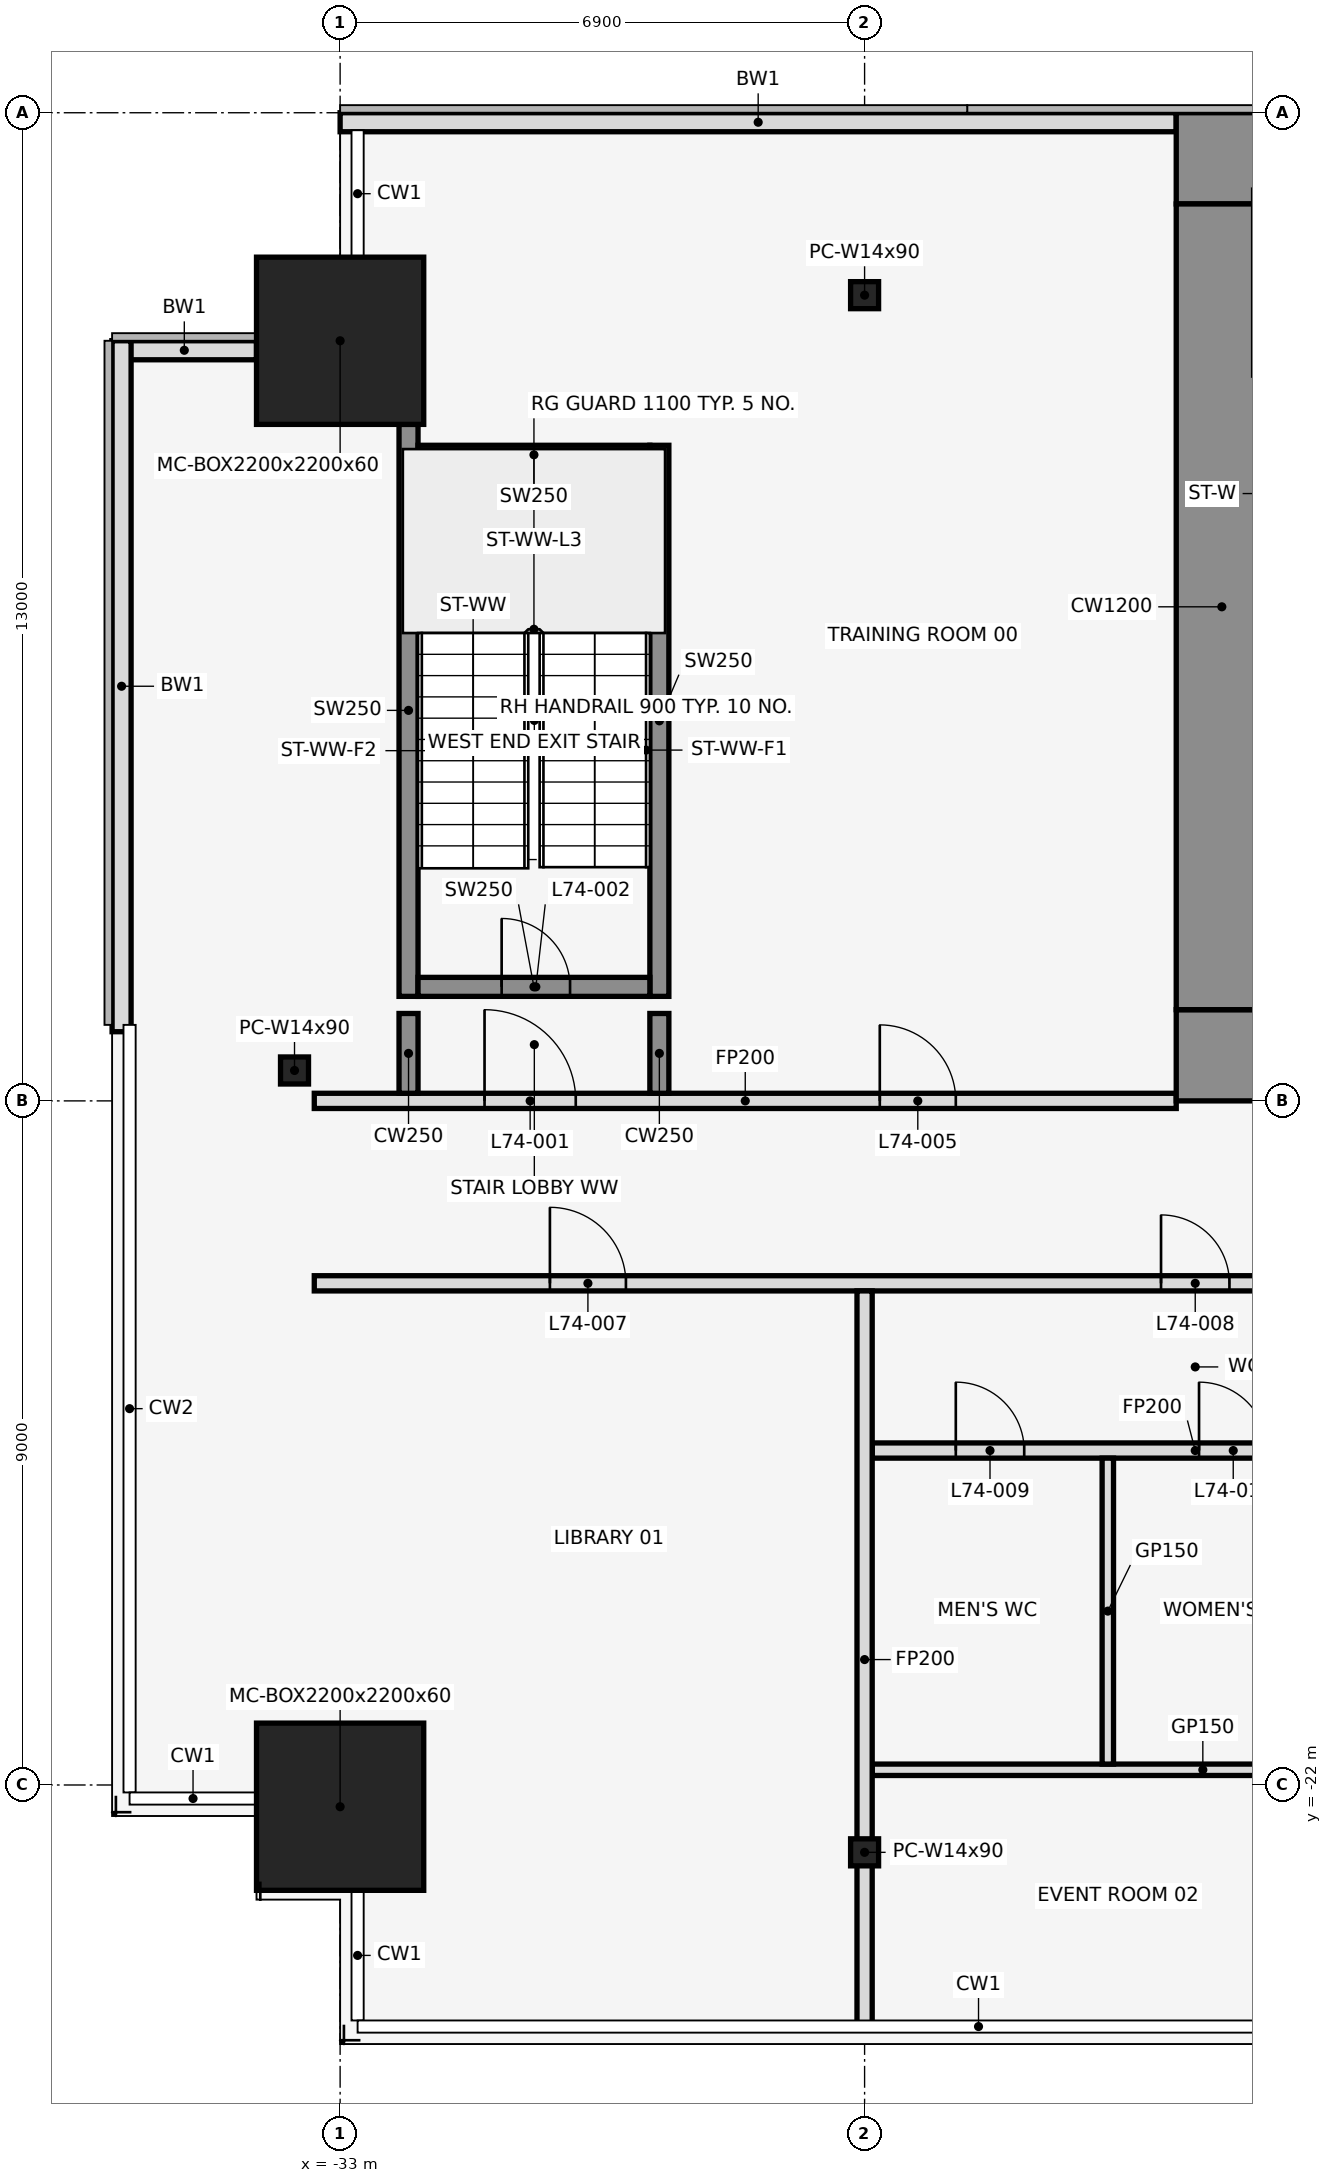
"""IFC4 building model, lengths in metres.
Left out: names, types, materials, properties, quantities, classifications, styles, units other than length and angle.
Written with IfcOpenShell. Run it as: python <this file> out.ifc"""

import sys

from ifc_helpers import new_model, si_unit, direction, frame, frame_2d, origin, origin_2d, place, context, subcontext, project, spatial, rectangle, hollow_rectangle, i_section, extrude, element, fill, save


model = new_model("IFC4")
c1 = context("Model", 3, precision=1e-05, world=origin(), true_north=direction((0.0, 1.0)))
c2 = subcontext(c1, "Body", "Model", "MODEL_VIEW")
j1 = project(units=[si_unit("LENGTHUNIT", "METRE"), si_unit("PLANEANGLEUNIT", "RADIAN")], contexts=[c1])
p1 = place(None, origin())
s1 = spatial("IfcSite", under=j1, at=p1, CompositionType="ELEMENT")
p2 = place(p1, origin())
s2 = spatial("IfcBuilding", under=s1, at=p2, CompositionType="ELEMENT")
p3 = place(p2, frame((0.0, 0.0, 329.0)))
s3 = spatial("IfcBuildingStorey", under=s2, at=p3, CompositionType="ELEMENT", Elevation=329.0)
for number, where, z_axis, x_axis in (
    (1, (-33.0, -22.286, 0.0), (0.0, 0.0, 1.0), (1.0, 0.0, 0.0)),
    (2, (-33.0, -3.0, 0.0), (0.0, 0.0, 1.0), (1.0, 0.0, 0.0)),
):
    element("IfcColumn", number, at=place(p3, frame(where, z_axis=z_axis, x_axis=x_axis)), inside=s3, PredefinedType="COLUMN", context=c2, shape_type="SweptSolid", body=[
        extrude(hollow_rectangle(XDim=2.2, YDim=2.2, WallThickness=0.06, at=origin_2d()), origin(), (0.0, 0.0, 1.0), 4.5),
    ])
for number, where, z_axis, x_axis in (
    (3, (-26.1, -22.886, 0.0), (0.0, 0.0, 1.0), (1.0, 0.0, 0.0)),
    (4, (-26.1, -2.4, 0.0), (0.0, 0.0, 1.0), (1.0, 0.0, 0.0)),
    (5, (-33.6, -12.6, 0.0), (0.0, 0.0, 1.0), (1.0, 0.0, 0.0)),
):
    element("IfcColumn", number, at=place(p3, frame(where, z_axis=z_axis, x_axis=x_axis)), inside=s3, PredefinedType="COLUMN", context=c2, shape_type="SweptSolid", body=[
        extrude(i_section(OverallWidth=0.368, OverallDepth=0.356, WebThickness=0.011, FlangeThickness=0.018, at=origin_2d()), origin(), (0.0, 0.0, 1.0), 4.5),
    ])
p4 = place(p3, frame((-22.0, -0.125, 0.0), z_axis=(0.0, 0.0, 1.0), x_axis=(-1.0, 0.0, 0.0)))
e6 = element("IfcWall", 6, at=p4, inside=s3, PredefinedType="STANDARD", context=c2, shape_type="SweptSolid", body=[
    extrude(rectangle(XDim=11.0, YDim=0.25, at=frame_2d((5.5, 0.0))), origin(), (0.0, 0.0, 1.0), 4.35),
])
p5 = place(p3, frame((-34.1, -3.125, 0.0), z_axis=(0.0, 0.0, 1.0), x_axis=(-1.0, 0.0, 0.0)))
e7 = element("IfcWall", 7, at=p5, inside=s3, PredefinedType="STANDARD", context=c2, shape_type="SweptSolid", body=[
    extrude(rectangle(XDim=1.9, YDim=0.25, at=frame_2d((0.95, 0.0))), origin(), (0.0, 0.0, 1.0), 4.35),
])
p6 = place(p3, frame((-35.875, -3.0, 0.0), z_axis=(0.0, 0.0, 1.0), x_axis=(0.0, -1.0, 0.0)))
e8 = element("IfcWall", 8, at=p6, inside=s3, PredefinedType="STANDARD", context=c2, shape_type="SweptSolid", body=[
    extrude(rectangle(XDim=9.09, YDim=0.25, at=frame_2d((4.545, 0.0))), origin(), (0.0, 0.0, 1.0), 4.35),
])
p7 = place(p3, frame((-32.1, -11.625, 0.0), z_axis=(0.0, 0.0, 1.0), x_axis=(0.0, 1.0, 0.0)))
e9 = element("IfcWall", 9, at=p7, inside=s3, PredefinedType="SHEAR", context=c2, shape_type="SweptSolid", body=[
    extrude(rectangle(XDim=7.525, YDim=0.25, at=frame_2d((3.762, 0.0))), origin(), (0.0, 0.0, 1.0), 4.5),
])
p8 = place(p3, frame((-28.8, -11.625, 0.0), z_axis=(0.0, 0.0, 1.0), x_axis=(0.0, 1.0, 0.0)))
e10 = element("IfcWall", 10, at=p8, inside=s3, PredefinedType="SHEAR", context=c2, shape_type="SweptSolid", body=[
    extrude(rectangle(XDim=7.25, YDim=0.25, at=frame_2d((3.625, 0.0))), origin(), (0.0, 0.0, 1.0), 4.5),
])
p9 = place(p3, frame((-31.975, -11.5, 0.0), z_axis=(0.0, 0.0, 1.0), x_axis=(1.0, 0.0, 0.0)))
e11 = element("IfcWall", 11, at=p9, inside=s3, PredefinedType="SHEAR", context=c2, shape_type="SweptSolid", body=[
    extrude(rectangle(XDim=3.05, YDim=0.25, at=frame_2d((1.525, 0.0))), origin(), (0.0, 0.0, 1.0), 4.5),
])
p10 = place(p9, frame((1.1, 0.0, 0.0)))
e12 = element("IfcOpeningElement", 12, at=p10, cuts=e11, PredefinedType="OPENING", context=c2, shape_type="SweptSolid", body=[
    extrude(rectangle(XDim=0.9, YDim=2.1, at=frame_2d((0.45, 1.05))), frame((0.0, 0.137, 0.0), z_axis=(0.0, -1.0, 0.0), x_axis=(1.0, 0.0, 0.0)), (0.0, 0.0, 1.0), 0.274),
])
p11 = place(p3, frame((-31.975, -4.5, 0.0), z_axis=(0.0, 0.0, 1.0), x_axis=(1.0, 0.0, 0.0)))
e13 = element("IfcWall", 13, at=p11, inside=s3, PredefinedType="SHEAR", context=c2, shape_type="SweptSolid", body=[
    extrude(rectangle(XDim=3.05, YDim=0.25, at=frame_2d((1.525, 0.0))), origin(), (0.0, 0.0, 1.0), 4.5),
])
p12 = place(p3, frame((-26.0, -21.8, 0.0), z_axis=(0.0, 0.0, 1.0), x_axis=(1.0, 0.0, 0.0)))
e14 = element("IfcWall", 14, at=p12, inside=s3, PredefinedType="PARTITIONING", context=c2, shape_type="SweptSolid", body=[
    extrude(rectangle(XDim=8.7, YDim=0.15, at=frame_2d((4.35, 0.0))), origin(), (0.0, 0.0, 1.0), 3.418),
])
p13 = place(p3, frame((-26.0, -17.6, 0.0), z_axis=(0.0, 0.0, 1.0), x_axis=(1.0, 0.0, 0.0)))
e15 = element("IfcWall", 15, at=p13, inside=s3, PredefinedType="PARTITIONING", context=c2, shape_type="SweptSolid", body=[
    extrude(rectangle(XDim=8.5, YDim=0.2, at=frame_2d((4.25, 0.0))), origin(), (0.0, 0.0, 1.0), 3.418),
])
p14 = place(p13, frame((1.1, 0.0, 0.0)))
e16 = element("IfcOpeningElement", 16, at=p14, cuts=e15, PredefinedType="OPENING", context=c2, shape_type="SweptSolid", body=[
    extrude(rectangle(XDim=0.9, YDim=2.1, at=frame_2d((0.45, 1.05))), frame((0.0, 0.112, 0.0), z_axis=(0.0, -1.0, 0.0), x_axis=(1.0, 0.0, 0.0)), (0.0, 0.0, 1.0), 0.224),
])
p15 = place(p13, frame((4.3, 0.0, 0.0)))
e17 = element("IfcOpeningElement", 17, at=p15, cuts=e15, PredefinedType="OPENING", context=c2, shape_type="SweptSolid", body=[
    extrude(rectangle(XDim=0.9, YDim=2.1, at=frame_2d((0.45, 1.05))), frame((0.0, 0.112, 0.0), z_axis=(0.0, -1.0, 0.0), x_axis=(1.0, 0.0, 0.0)), (0.0, 0.0, 1.0), 0.224),
])
p16 = place(p13, frame((6.9, 0.0, 0.0)))
e18 = element("IfcOpeningElement", 18, at=p16, cuts=e15, PredefinedType="OPENING", context=c2, shape_type="SweptSolid", body=[
    extrude(rectangle(XDim=1.0, YDim=2.1, at=frame_2d((0.5, 1.05))), frame((0.0, 0.112, 0.0), z_axis=(0.0, -1.0, 0.0), x_axis=(1.0, 0.0, 0.0)), (0.0, 0.0, 1.0), 0.224),
])
p17 = place(p3, frame((-33.34, -15.4, 0.0), z_axis=(0.0, 0.0, 1.0), x_axis=(1.0, 0.0, 0.0)))
e19 = element("IfcWall", 19, at=p17, inside=s3, PredefinedType="PARTITIONING", context=c2, shape_type="SweptSolid", body=[
    extrude(rectangle(XDim=31.94, YDim=0.2, at=frame_2d((15.97, 0.0))), origin(), (0.0, 0.0, 1.0), 3.418),
])
p18 = place(p17, frame((3.1, 0.0, 0.0)))
e20 = element("IfcOpeningElement", 20, at=p18, cuts=e19, PredefinedType="OPENING", context=c2, shape_type="SweptSolid", body=[
    extrude(rectangle(XDim=1.0, YDim=2.1, at=frame_2d((0.5, 1.05))), frame((0.0, 0.112, 0.0), z_axis=(0.0, -1.0, 0.0), x_axis=(1.0, 0.0, 0.0)), (0.0, 0.0, 1.0), 0.224),
])
p19 = place(p17, frame((11.14, 0.0, 0.0)))
e21 = element("IfcOpeningElement", 21, at=p19, cuts=e19, PredefinedType="OPENING", context=c2, shape_type="SweptSolid", body=[
    extrude(rectangle(XDim=0.9, YDim=2.1, at=frame_2d((0.45, 1.05))), frame((0.0, 0.112, 0.0), z_axis=(0.0, -1.0, 0.0), x_axis=(1.0, 0.0, 0.0)), (0.0, 0.0, 1.0), 0.224),
])
p20 = place(p17, frame((16.84, 0.0, 0.0)))
e22 = element("IfcOpeningElement", 22, at=p20, cuts=e19, PredefinedType="OPENING", context=c2, shape_type="SweptSolid", body=[
    extrude(rectangle(XDim=1.0, YDim=2.1, at=frame_2d((0.5, 1.05))), frame((0.0, 0.112, 0.0), z_axis=(0.0, -1.0, 0.0), x_axis=(1.0, 0.0, 0.0)), (0.0, 0.0, 1.0), 0.224),
])
p21 = place(p3, frame((-33.34, -13.0, 0.0), z_axis=(0.0, 0.0, 1.0), x_axis=(1.0, 0.0, 0.0)))
e23 = element("IfcWall", 23, at=p21, inside=s3, PredefinedType="PARTITIONING", context=c2, shape_type="SweptSolid", body=[
    extrude(rectangle(XDim=11.34, YDim=0.2, at=frame_2d((5.67, 0.0))), origin(), (0.0, 0.0, 1.0), 3.418),
])
p22 = place(p21, frame((2.24, 0.0, 0.0)))
e24 = element("IfcOpeningElement", 24, at=p22, cuts=e23, PredefinedType="OPENING", context=c2, shape_type="SweptSolid", body=[
    extrude(rectangle(XDim=1.2, YDim=2.1, at=frame_2d((0.6, 1.05))), frame((0.0, 0.112, 0.0), z_axis=(0.0, -1.0, 0.0), x_axis=(1.0, 0.0, 0.0)), (0.0, 0.0, 1.0), 0.224),
])
p23 = place(p21, frame((7.44, 0.0, 0.0)))
e25 = element("IfcOpeningElement", 25, at=p23, cuts=e23, PredefinedType="OPENING", context=c2, shape_type="SweptSolid", body=[
    extrude(rectangle(XDim=1.0, YDim=2.1, at=frame_2d((0.5, 1.05))), frame((0.0, 0.112, 0.0), z_axis=(0.0, -1.0, 0.0), x_axis=(1.0, 0.0, 0.0)), (0.0, 0.0, 1.0), 0.224),
])
for number, where, z_axis, x_axis in (
    (26, (-32.1, -12.9, 0.0), (0.0, 0.0, 1.0), (0.0, 1.0, 0.0)),
    (27, (-28.8, -12.9, 0.0), (0.0, 0.0, 1.0), (0.0, 1.0, 0.0)),
):
    element("IfcWall", number, at=place(p3, frame(where, z_axis=z_axis, x_axis=x_axis)), inside=s3, PredefinedType="SHEAR", context=c2, shape_type="SweptSolid", body=[
        extrude(rectangle(XDim=1.05, YDim=0.25, at=frame_2d((0.525, 0.0))), origin(), (0.0, 0.0, 1.0), 4.5),
    ])
p24 = place(p3, frame((-26.1, -25.2, 0.0), z_axis=(0.0, 0.0, 1.0), x_axis=(0.0, 1.0, 0.0)))
e28 = element("IfcWall", 28, at=p24, inside=s3, PredefinedType="PARTITIONING", context=c2, shape_type="SweptSolid", body=[
    extrude(rectangle(XDim=9.7, YDim=0.2, at=frame_2d((4.85, 0.0))), origin(), (0.0, 0.0, 1.0), 3.418),
])
p25 = place(p3, frame((-22.9, -21.725, 0.0), z_axis=(0.0, 0.0, 1.0), x_axis=(0.0, 1.0, 0.0)))
e29 = element("IfcWall", 29, at=p25, inside=s3, PredefinedType="PARTITIONING", context=c2, shape_type="SweptSolid", body=[
    extrude(rectangle(XDim=4.025, YDim=0.15, at=frame_2d((2.013, 0.0))), origin(), (0.0, 0.0, 1.0), 3.418),
])
p26 = place(p3, frame((-22.0, -0.6, 0.0), z_axis=(0.0, 0.0, 1.0), x_axis=(1.0, 0.0, 0.0)))
e30 = element("IfcWall", 30, at=p26, inside=s3, PredefinedType="SHEAR", context=c2, shape_type="SweptSolid", body=[
    extrude(rectangle(XDim=44.0, YDim=1.2, at=frame_2d((22.0, 0.0))), origin(), (0.0, 0.0, 1.0), 4.5),
])
p27 = place(p26, frame((18.55, 0.0, 0.0)))
e31 = element("IfcOpeningElement", 31, at=p27, cuts=e30, PredefinedType="OPENING", context=c2, shape_type="SweptSolid", body=[
    extrude(rectangle(XDim=0.9, YDim=2.1, at=frame_2d((0.45, 1.05))), frame((0.0, 0.612, 0.0), z_axis=(0.0, -1.0, 0.0), x_axis=(1.0, 0.0, 0.0)), (0.0, 0.0, 1.0), 1.224),
])
p28 = place(p26, frame((24.55, 0.0, 0.0)))
e32 = element("IfcOpeningElement", 32, at=p28, cuts=e30, PredefinedType="OPENING", context=c2, shape_type="SweptSolid", body=[
    extrude(rectangle(XDim=0.9, YDim=2.1, at=frame_2d((0.45, 1.05))), frame((0.0, 0.612, 0.0), z_axis=(0.0, -1.0, 0.0), x_axis=(1.0, 0.0, 0.0)), (0.0, 0.0, 1.0), 1.224),
])
p29 = place(p3, frame((-22.0, -12.4, 0.0), z_axis=(0.0, 0.0, 1.0), x_axis=(1.0, 0.0, 0.0)))
e33 = element("IfcWall", 33, at=p29, inside=s3, PredefinedType="SHEAR", context=c2, shape_type="SweptSolid", body=[
    extrude(rectangle(XDim=44.0, YDim=1.2, at=frame_2d((22.0, 0.0))), origin(), (0.0, 0.0, 1.0), 4.5),
])
p30 = place(p29, frame((2.2, 0.0, 0.0)))
e34 = element("IfcOpeningElement", 34, at=p30, cuts=e33, PredefinedType="OPENING", context=c2, shape_type="SweptSolid", body=[
    extrude(rectangle(XDim=1.2, YDim=2.1, at=frame_2d((0.6, 1.05))), frame((0.0, 0.612, 0.0), z_axis=(0.0, -1.0, 0.0), x_axis=(1.0, 0.0, 0.0)), (0.0, 0.0, 1.0), 1.224),
])
p31 = place(p29, frame((21.4, 0.0, 0.0)))
e35 = element("IfcOpeningElement", 35, at=p31, cuts=e33, PredefinedType="OPENING", context=c2, shape_type="SweptSolid", body=[
    extrude(rectangle(XDim=1.2, YDim=2.1, at=frame_2d((0.6, 1.05))), frame((0.0, 0.612, 0.0), z_axis=(0.0, -1.0, 0.0), x_axis=(1.0, 0.0, 0.0)), (0.0, 0.0, 1.0), 1.224),
])
p32 = place(p29, frame((40.6, 0.0, 0.0)))
e36 = element("IfcOpeningElement", 36, at=p32, cuts=e33, PredefinedType="OPENING", context=c2, shape_type="SweptSolid", body=[
    extrude(rectangle(XDim=1.2, YDim=2.1, at=frame_2d((0.6, 1.05))), frame((0.0, 0.612, 0.0), z_axis=(0.0, -1.0, 0.0), x_axis=(1.0, 0.0, 0.0)), (0.0, 0.0, 1.0), 1.224),
])
p33 = place(p29, frame((16.0, 0.0, 0.0)))
e37 = element("IfcOpeningElement", 37, at=p33, cuts=e33, PredefinedType="OPENING", context=c2, shape_type="SweptSolid", body=[
    extrude(rectangle(XDim=1.8, YDim=2.1, at=frame_2d((0.9, 1.05))), frame((0.0, 0.612, 0.0), z_axis=(0.0, -1.0, 0.0), x_axis=(1.0, 0.0, 0.0)), (0.0, 0.0, 1.0), 1.224),
])
p34 = place(p29, frame((6.3, 0.0, 0.0)))
e38 = element("IfcOpeningElement", 38, at=p34, cuts=e33, PredefinedType="OPENING", context=c2, shape_type="SweptSolid", body=[
    extrude(rectangle(XDim=1.2, YDim=2.1, at=frame_2d((0.6, 1.05))), frame((0.0, 0.612, 0.0), z_axis=(0.0, -1.0, 0.0), x_axis=(1.0, 0.0, 0.0)), (0.0, 0.0, 1.0), 1.224),
])
p35 = place(p29, frame((26.2, 0.0, 0.0)))
e39 = element("IfcOpeningElement", 39, at=p35, cuts=e33, PredefinedType="OPENING", context=c2, shape_type="SweptSolid", body=[
    extrude(rectangle(XDim=1.8, YDim=2.1, at=frame_2d((0.9, 1.05))), frame((0.0, 0.612, 0.0), z_axis=(0.0, -1.0, 0.0), x_axis=(1.0, 0.0, 0.0)), (0.0, 0.0, 1.0), 1.224),
])
p36 = place(p29, frame((36.5, 0.0, 0.0)))
e40 = element("IfcOpeningElement", 40, at=p36, cuts=e33, PredefinedType="OPENING", context=c2, shape_type="SweptSolid", body=[
    extrude(rectangle(XDim=1.2, YDim=2.1, at=frame_2d((0.6, 1.05))), frame((0.0, 0.612, 0.0), z_axis=(0.0, -1.0, 0.0), x_axis=(1.0, 0.0, 0.0)), (0.0, 0.0, 1.0), 1.224),
])
p37 = place(p3, frame((-21.4, -11.8, 0.0), z_axis=(0.0, 0.0, 1.0), x_axis=(0.0, 1.0, 0.0)))
e41 = element("IfcWall", 41, at=p37, inside=s3, PredefinedType="SHEAR", context=c2, shape_type="SweptSolid", body=[
    extrude(rectangle(XDim=10.6, YDim=1.2, at=frame_2d((5.3, 0.0))), origin(), (0.0, 0.0, 1.0), 4.5),
])
p38 = place(p22, origin())
e42 = element("IfcDoor", 42, at=p38, inside=s3, OperationType="SINGLE_SWING_LEFT", PredefinedType="DOOR", context=c2, shape_type="SweptSolid", body=[
    extrude(rectangle(XDim=1.2, YDim=2.1, at=frame_2d((0.6, 1.05))), frame((0.0, 0.025, 0.0), z_axis=(0.0, -1.0, 0.0), x_axis=(1.0, 0.0, 0.0)), (0.0, 0.0, 1.0), 0.05),
])
fill(e24, e42)
p39 = place(p10, origin())
e43 = element("IfcDoor", 43, at=p39, inside=s3, OperationType="SINGLE_SWING_LEFT", PredefinedType="DOOR", context=c2, shape_type="SweptSolid", body=[
    extrude(rectangle(XDim=0.9, YDim=2.1, at=frame_2d((0.45, 1.05))), frame((0.0, 0.025, 0.0), z_axis=(0.0, -1.0, 0.0), x_axis=(1.0, 0.0, 0.0)), (0.0, 0.0, 1.0), 0.05),
])
fill(e12, e43)
p40 = place(p23, origin())
e44 = element("IfcDoor", 44, at=p40, inside=s3, OperationType="SINGLE_SWING_LEFT", PredefinedType="DOOR", context=c2, shape_type="SweptSolid", body=[
    extrude(rectangle(XDim=1.0, YDim=2.1, at=frame_2d((0.5, 1.05))), frame((0.0, 0.025, 0.0), z_axis=(0.0, -1.0, 0.0), x_axis=(1.0, 0.0, 0.0)), (0.0, 0.0, 1.0), 0.05),
])
fill(e25, e44)
p41 = place(p18, frame((1.0, 0.0, 0.0), z_axis=(0.0, 0.0, 1.0), x_axis=(-1.0, 0.0, 0.0)))
e45 = element("IfcDoor", 45, at=p41, inside=s3, OperationType="SINGLE_SWING_LEFT", PredefinedType="DOOR", context=c2, shape_type="SweptSolid", body=[
    extrude(rectangle(XDim=1.0, YDim=2.1, at=frame_2d((0.5, 1.05))), frame((0.0, 0.025, 0.0), z_axis=(0.0, -1.0, 0.0), x_axis=(1.0, 0.0, 0.0)), (0.0, 0.0, 1.0), 0.05),
])
fill(e20, e45)
p42 = place(p19, frame((0.9, 0.0, 0.0), z_axis=(0.0, 0.0, 1.0), x_axis=(-1.0, 0.0, 0.0)))
e46 = element("IfcDoor", 46, at=p42, inside=s3, OperationType="SINGLE_SWING_RIGHT", PredefinedType="DOOR", context=c2, shape_type="SweptSolid", body=[
    extrude(rectangle(XDim=0.9, YDim=2.1, at=frame_2d((0.45, 1.05))), frame((0.0, 0.025, 0.0), z_axis=(0.0, -1.0, 0.0), x_axis=(1.0, 0.0, 0.0)), (0.0, 0.0, 1.0), 0.05),
])
fill(e21, e46)
p43 = place(p14, frame((0.9, 0.0, 0.0), z_axis=(0.0, 0.0, 1.0), x_axis=(-1.0, 0.0, 0.0)))
e47 = element("IfcDoor", 47, at=p43, inside=s3, OperationType="SINGLE_SWING_RIGHT", PredefinedType="DOOR", context=c2, shape_type="SweptSolid", body=[
    extrude(rectangle(XDim=0.9, YDim=2.1, at=frame_2d((0.45, 1.05))), frame((0.0, 0.025, 0.0), z_axis=(0.0, -1.0, 0.0), x_axis=(1.0, 0.0, 0.0)), (0.0, 0.0, 1.0), 0.05),
])
fill(e16, e47)
p44 = place(p15, frame((0.9, 0.0, 0.0), z_axis=(0.0, 0.0, 1.0), x_axis=(-1.0, 0.0, 0.0)))
e48 = element("IfcDoor", 48, at=p44, inside=s3, OperationType="SINGLE_SWING_LEFT", PredefinedType="DOOR", context=c2, shape_type="SweptSolid", body=[
    extrude(rectangle(XDim=0.9, YDim=2.1, at=frame_2d((0.45, 1.05))), frame((0.0, 0.025, 0.0), z_axis=(0.0, -1.0, 0.0), x_axis=(1.0, 0.0, 0.0)), (0.0, 0.0, 1.0), 0.05),
])
fill(e17, e48)
save(model, sys.argv[1])
